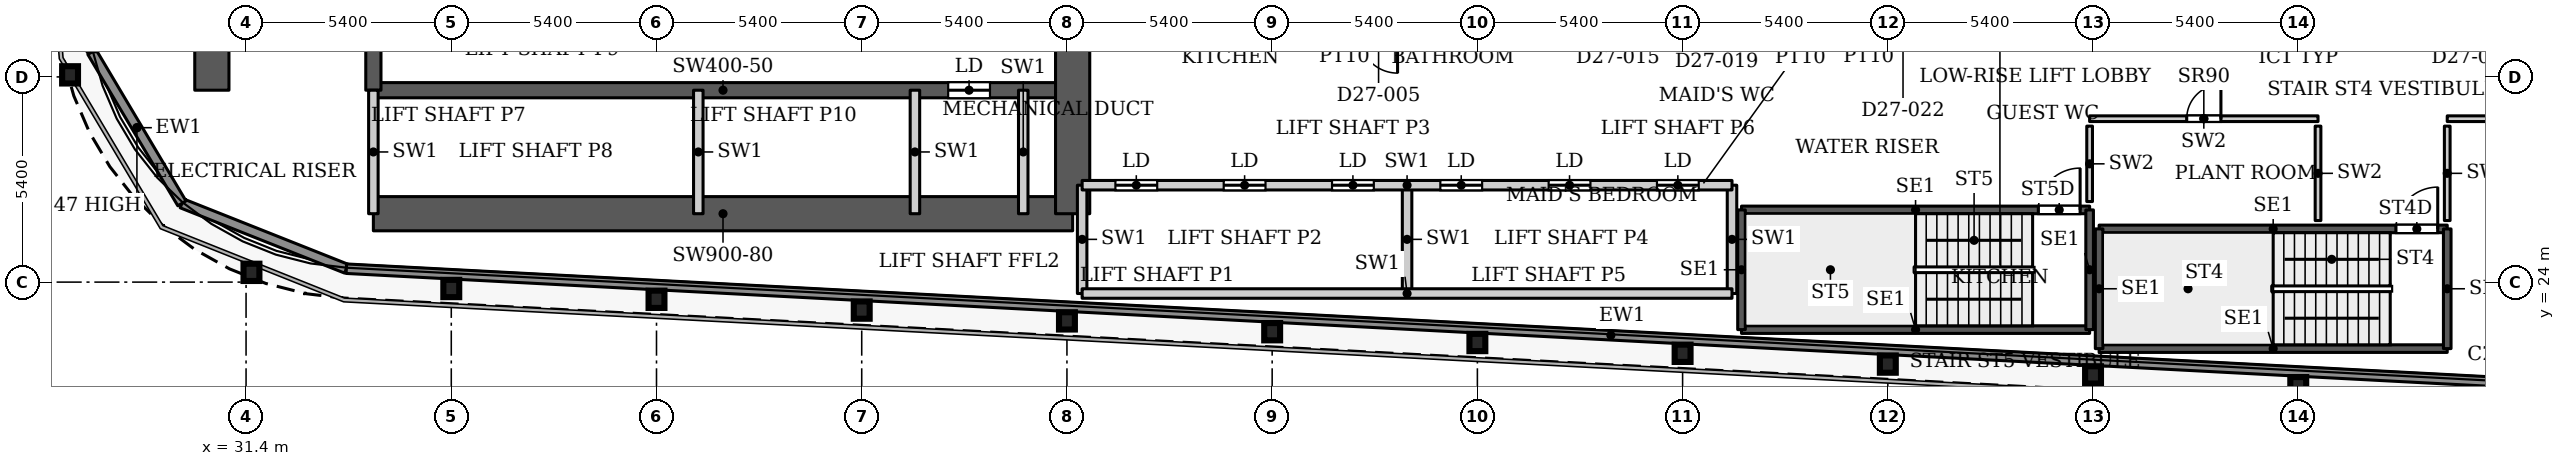
"""IFC4 building model, lengths in metres.
Left out: names, types, materials, properties, quantities, classifications, styles, units other than length and angle.
Written with IfcOpenShell. Run it as: python <this file> out.ifc"""

import sys

from ifc_helpers import new_model, si_unit, direction, frame, frame_2d, origin, origin_2d, place, context, subcontext, project, spatial, rectangle, i_section, extrude, source, transform, mapped, element, fill, save


model = new_model("IFC4")
c1 = context("Model", 3, precision=1e-05, world=origin(), true_north=direction((0.0, 1.0)))
c2 = subcontext(c1, "Body", "Model", "MODEL_VIEW")
j1 = project(units=[si_unit("LENGTHUNIT", "METRE"), si_unit("PLANEANGLEUNIT", "RADIAN")], contexts=[c1])
p1 = place(None, origin())
s1 = spatial("IfcSite", under=j1, at=p1, CompositionType="ELEMENT")
p2 = place(p1, origin())
s2 = spatial("IfcBuilding", under=s1, at=p2, CompositionType="ELEMENT")
p3 = place(p2, frame((0.0, 0.0, 117.5)))
s3 = spatial("IfcBuildingStorey", under=s2, at=p3, CompositionType="ELEMENT", Elevation=117.5)
for number, where, z_axis, x_axis in (
    (1, (85.4, 21.274, 0.0), (0.0, 0.0, 1.0), (1.0, 0.0, 0.0)),
    (2, (80.0, 21.558, 0.0), (0.0, 0.0, 1.0), (1.0, 0.0, 0.0)),
    (3, (74.6, 21.843, 0.0), (0.0, 0.0, 1.0), (1.0, 0.0, 0.0)),
    (4, (69.2, 22.127, 0.0), (0.0, 0.0, 1.0), (1.0, 0.0, 0.0)),
    (5, (63.8, 22.411, 0.0), (0.0, 0.0, 1.0), (1.0, 0.0, 0.0)),
    (6, (58.4, 22.695, 0.0), (0.0, 0.0, 1.0), (1.0, 0.0, 0.0)),
    (7, (53.0, 22.98, 0.0), (0.0, 0.0, 1.0), (1.0, 0.0, 0.0)),
    (8, (47.6, 23.264, 0.0), (0.0, 0.0, 1.0), (1.0, 0.0, 0.0)),
    (9, (42.2, 23.548, 0.0), (0.0, 0.0, 1.0), (1.0, 0.0, 0.0)),
    (10, (36.8, 23.832, 0.0), (0.0, 0.0, 1.0), (1.0, 0.0, 0.0)),
    (11, (31.542, 24.257, 0.0), (0.0, 0.0, 1.0), (1.0, 0.0, 0.0)),
    (12, (26.769, 29.454, 0.0), (0.0, 0.0, 1.0), (1.0, 0.0, 0.0)),
):
    element("IfcColumn", number, at=place(p3, frame(where, z_axis=z_axis, x_axis=x_axis)), inside=s3, PredefinedType="COLUMN", context=c2, shape_type="SweptSolid", body=[
        extrude(i_section(OverallWidth=0.418, OverallDepth=0.455, WebThickness=0.042, FlangeThickness=0.068, FilletRadius=0.014, at=origin_2d()), origin(), (0.0, 0.0, 1.0), 3.9),
    ])
p4 = place(p3, frame((34.75, 25.8, 0.0), z_axis=(0.0, 0.0, 1.0), x_axis=(1.0, 0.0, 0.0)))
e13 = element("IfcWall", 13, at=p4, inside=s3, PredefinedType="SHEAR", context=c2, shape_type="SweptSolid", body=[
    extrude(rectangle(XDim=18.4, YDim=0.9, at=frame_2d((9.2, 0.0))), origin(), (0.0, 0.0, 1.0), 3.9),
])
p5 = place(p3, frame((34.75, 29.05, 0.0), z_axis=(0.0, 0.0, 1.0), x_axis=(1.0, 0.0, 0.0)))
e14 = element("IfcWall", 14, at=p5, inside=s3, PredefinedType="SHEAR", context=c2, shape_type="SweptSolid", body=[
    extrude(rectangle(XDim=18.4, YDim=0.4, at=frame_2d((9.2, 0.0))), origin(), (0.0, 0.0, 1.0), 3.9),
])
p6 = place(p5, frame((15.125, 0.0, 0.0)))
e15 = element("IfcOpeningElement", 15, at=p6, cuts=e14, PredefinedType="OPENING", context=c2, shape_type="SweptSolid", body=[
    extrude(rectangle(XDim=1.1, YDim=2.2, at=frame_2d((0.55, 1.1))), frame((0.0, 0.21, 0.0), z_axis=(0.0, -1.0, 0.0), x_axis=(1.0, 0.0, 0.0)), (0.0, 0.0, 1.0), 0.42),
])
p7 = place(p3, frame((34.75, 29.05, 0.0), z_axis=(0.0, 0.0, 1.0), x_axis=(0.0, 1.0, 0.0)))
e16 = element("IfcWall", 16, at=p7, inside=s3, PredefinedType="SHEAR", context=c2, shape_type="SweptSolid", body=[
    extrude(rectangle(XDim=18.45, YDim=0.4, at=frame_2d((9.225, 0.0))), origin(), (0.0, 0.0, 1.0), 3.9),
])
p8 = place(p7, frame((8.025, 0.0, 0.0)))
e17 = element("IfcOpeningElement", 17, at=p8, cuts=e16, PredefinedType="OPENING", context=c2, shape_type="SweptSolid", body=[
    extrude(rectangle(XDim=1.1, YDim=2.2, at=frame_2d((0.55, 1.1))), frame((0.0, 0.21, 0.0), z_axis=(0.0, -1.0, 0.0), x_axis=(1.0, 0.0, 0.0)), (0.0, 0.0, 1.0), 0.42),
])
p9 = place(p7, frame((10.875, 0.0, 0.0)))
e18 = element("IfcOpeningElement", 18, at=p9, cuts=e16, PredefinedType="OPENING", context=c2, shape_type="SweptSolid", body=[
    extrude(rectangle(XDim=1.1, YDim=2.2, at=frame_2d((0.55, 1.1))), frame((0.0, 0.21, 0.0), z_axis=(0.0, -1.0, 0.0), x_axis=(1.0, 0.0, 0.0)), (0.0, 0.0, 1.0), 0.42),
])
p10 = place(p7, frame((13.725, 0.0, 0.0)))
e19 = element("IfcOpeningElement", 19, at=p10, cuts=e16, PredefinedType="OPENING", context=c2, shape_type="SweptSolid", body=[
    extrude(rectangle(XDim=1.1, YDim=2.2, at=frame_2d((0.55, 1.1))), frame((0.0, 0.21, 0.0), z_axis=(0.0, -1.0, 0.0), x_axis=(1.0, 0.0, 0.0)), (0.0, 0.0, 1.0), 0.42),
])
p11 = place(p7, frame((15.95, 0.0, 0.0)))
e20 = element("IfcOpeningElement", 20, at=p11, cuts=e16, PredefinedType="OPENING", context=c2, shape_type="SweptSolid", body=[
    extrude(rectangle(XDim=1.1, YDim=2.2, at=frame_2d((0.55, 1.1))), frame((0.0, 0.21, 0.0), z_axis=(0.0, -1.0, 0.0), x_axis=(1.0, 0.0, 0.0)), (0.0, 0.0, 1.0), 0.42),
])
p12 = place(p3, frame((30.5, 29.05, 0.0), z_axis=(0.0, 0.0, 1.0), x_axis=(0.0, 1.0, 0.0)))
e21 = element("IfcWall", 21, at=p12, inside=s3, PredefinedType="SHEAR", context=c2, shape_type="SweptSolid", body=[
    extrude(rectangle(XDim=18.45, YDim=0.9, at=frame_2d((9.225, 0.0))), origin(), (0.0, 0.0, 1.0), 3.9),
])
p13 = place(p12, frame((6.55, 0.0, 0.0)))
e22 = element("IfcOpeningElement", 22, at=p13, cuts=e21, PredefinedType="OPENING", context=c2, shape_type="SweptSolid", body=[
    extrude(rectangle(XDim=0.9, YDim=2.2, at=frame_2d((0.45, 1.1))), frame((0.0, 0.46, 0.0), z_axis=(0.0, -1.0, 0.0), x_axis=(1.0, 0.0, 0.0)), (0.0, 0.0, 1.0), 0.92),
])
p14 = place(p12, frame((11.025, 0.0, 0.0)))
e23 = element("IfcOpeningElement", 23, at=p14, cuts=e21, PredefinedType="OPENING", context=c2, shape_type="SweptSolid", body=[
    extrude(rectangle(XDim=0.9, YDim=2.2, at=frame_2d((0.45, 1.1))), frame((0.0, 0.46, 0.0), z_axis=(0.0, -1.0, 0.0), x_axis=(1.0, 0.0, 0.0)), (0.0, 0.0, 1.0), 0.92),
])
p15 = place(p3, frame((53.15, 25.8, 0.0), z_axis=(0.0, 0.0, 1.0), x_axis=(0.0, 1.0, 0.0)))
e24 = element("IfcWall", 24, at=p15, inside=s3, PredefinedType="SHEAR", context=c2, shape_type="SweptSolid", body=[
    extrude(rectangle(XDim=10.4, YDim=0.9, at=frame_2d((5.2, 0.0))), origin(), (0.0, 0.0, 1.0), 3.9),
])
p16 = place(p3, frame((34.039, 24.353, 0.0), z_axis=(0.0, 0.0, 1.0), x_axis=(-0.929352825399, 0.369192803184, 0.0)))
e25 = element("IfcWall", 25, at=p16, inside=s3, PredefinedType="SOLIDWALL", context=c2, shape_type="SweptSolid", body=[
    extrude(rectangle(XDim=4.656, YDim=0.25, at=frame_2d((2.328, 0.0))), origin(), (0.0, 0.0, 1.0), 3.75),
])
p17 = place(p3, frame((29.712, 26.072, 0.0), z_axis=(0.0, 0.0, 1.0), x_axis=(-0.511028049012, 0.859564036662, 0.0)))
e26 = element("IfcWall", 26, at=p17, inside=s3, PredefinedType="SOLIDWALL", context=c2, shape_type="SweptSolid", body=[
    extrude(rectangle(XDim=4.634, YDim=0.25, at=frame_2d((2.317, 0.0))), origin(), (0.0, 0.0, 1.0), 3.147),
])
p18 = place(p3, frame((27.344, 30.055, 0.0), z_axis=(0.0, 0.0, 1.0), x_axis=(-0.077571675317, 0.99698677784, 0.0)))
e27 = element("IfcWall", 27, at=p18, inside=s3, PredefinedType="SOLIDWALL", context=c2, shape_type="SweptSolid", body=[
    extrude(rectangle(XDim=1.92, YDim=0.25, at=frame_2d((0.96, 0.0))), origin(), (0.0, 0.0, 1.0), 3.75),
])
p19 = place(p3, frame((100.586, 20.85, 0.0), z_axis=(0.0, 0.0, 1.0), x_axis=(-0.99861746497, 0.052565755559, 0.0)))
e28 = element("IfcWall", 28, at=p19, inside=s3, PredefinedType="SOLIDWALL", context=c2, shape_type="SweptSolid", body=[
    extrude(rectangle(XDim=66.639, YDim=0.25, at=frame_2d((33.319, 0.0))), origin(), (0.0, 0.0, 1.0), 3.75),
])
p20 = place(p3, frame((80.16, 22.25, 0.0), z_axis=(0.0, 0.0, 1.0), x_axis=(1.0, 0.0, 0.0)))
e29 = element("IfcWall", 29, at=p20, inside=s3, PredefinedType="SHEAR", context=c2, shape_type="SweptSolid", body=[
    extrude(rectangle(XDim=9.16, YDim=0.2, at=frame_2d((4.58, 0.0))), origin(), (0.0, 0.0, 1.0), 3.9),
])
p21 = place(p3, frame((80.16, 25.4, 0.0), z_axis=(0.0, 0.0, 1.0), x_axis=(1.0, 0.0, 0.0)))
e30 = element("IfcWall", 30, at=p21, inside=s3, PredefinedType="SHEAR", context=c2, shape_type="SweptSolid", body=[
    extrude(rectangle(XDim=9.16, YDim=0.2, at=frame_2d((4.58, 0.0))), origin(), (0.0, 0.0, 1.0), 3.9),
])
p22 = place(p21, frame((7.81, 0.0, 0.0)))
e31 = element("IfcOpeningElement", 31, at=p22, cuts=e30, PredefinedType="OPENING", context=c2, shape_type="SweptSolid", body=[
    extrude(rectangle(XDim=1.1, YDim=2.2, at=frame_2d((0.55, 1.1))), frame((0.0, 0.11, 0.0), z_axis=(0.0, -1.0, 0.0), x_axis=(1.0, 0.0, 0.0)), (0.0, 0.0, 1.0), 0.22),
])
for number, where, z_axis, x_axis in (
    (32, (80.16, 22.25, 0.0), (0.0, 0.0, 1.0), (0.0, 1.0, 0.0)),
    (33, (89.32, 22.25, 0.0), (0.0, 0.0, 1.0), (0.0, 1.0, 0.0)),
):
    element("IfcWall", number, at=place(p3, frame(where, z_axis=z_axis, x_axis=x_axis)), inside=s3, PredefinedType="SHEAR", context=c2, shape_type="SweptSolid", body=[
        extrude(rectangle(XDim=3.15, YDim=0.2, at=frame_2d((1.575, 0.0))), origin(), (0.0, 0.0, 1.0), 3.9),
    ])
p23 = place(p3, frame((70.75, 22.75, 0.0), z_axis=(0.0, 0.0, 1.0), x_axis=(1.0, 0.0, 0.0)))
e34 = element("IfcWall", 34, at=p23, inside=s3, PredefinedType="SHEAR", context=c2, shape_type="SweptSolid", body=[
    extrude(rectangle(XDim=9.16, YDim=0.2, at=frame_2d((4.58, 0.0))), origin(), (0.0, 0.0, 1.0), 3.9),
])
p24 = place(p3, frame((70.75, 25.9, 0.0), z_axis=(0.0, 0.0, 1.0), x_axis=(1.0, 0.0, 0.0)))
e35 = element("IfcWall", 35, at=p24, inside=s3, PredefinedType="SHEAR", context=c2, shape_type="SweptSolid", body=[
    extrude(rectangle(XDim=9.16, YDim=0.2, at=frame_2d((4.58, 0.0))), origin(), (0.0, 0.0, 1.0), 3.9),
])
p25 = place(p24, frame((7.81, 0.0, 0.0)))
e36 = element("IfcOpeningElement", 36, at=p25, cuts=e35, PredefinedType="OPENING", context=c2, shape_type="SweptSolid", body=[
    extrude(rectangle(XDim=1.1, YDim=2.2, at=frame_2d((0.55, 1.1))), frame((0.0, 0.11, 0.0), z_axis=(0.0, -1.0, 0.0), x_axis=(1.0, 0.0, 0.0)), (0.0, 0.0, 1.0), 0.22),
])
for number, where, z_axis, x_axis in (
    (37, (70.75, 22.75, 0.0), (0.0, 0.0, 1.0), (0.0, 1.0, 0.0)),
    (38, (79.91, 22.75, 0.0), (0.0, 0.0, 1.0), (0.0, 1.0, 0.0)),
):
    element("IfcWall", number, at=place(p3, frame(where, z_axis=z_axis, x_axis=x_axis)), inside=s3, PredefinedType="SHEAR", context=c2, shape_type="SweptSolid", body=[
        extrude(rectangle(XDim=3.15, YDim=0.2, at=frame_2d((1.575, 0.0))), origin(), (0.0, 0.0, 1.0), 3.9),
    ])
for number, where, z_axis, x_axis in (
    (39, (34.75, 25.8, 0.0), (0.0, 0.0, 1.0), (0.0, 1.0, 0.0)),
    (40, (43.3, 25.8, 0.0), (0.0, 0.0, 1.0), (0.0, 1.0, 0.0)),
    (41, (49.0, 25.8, 0.0), (0.0, 0.0, 1.0), (0.0, 1.0, 0.0)),
    (42, (51.85, 25.8, 0.0), (0.0, 0.0, 1.0), (0.0, 1.0, 0.0)),
):
    element("IfcWall", number, at=place(p3, frame(where, z_axis=z_axis, x_axis=x_axis)), inside=s3, PredefinedType="PARTITIONING", context=c2, shape_type="SweptSolid", body=[
        extrude(rectangle(XDim=3.25, YDim=0.25, at=frame_2d((1.625, 0.0))), origin(), (0.0, 0.0, 1.0), 3.9),
    ])
for number, where, z_axis, x_axis in (
    (43, (53.4, 23.7, 0.0), (0.0, 0.0, 1.0), (0.0, 1.0, 0.0)),
    (44, (61.95, 23.7, 0.0), (0.0, 0.0, 1.0), (0.0, 1.0, 0.0)),
    (45, (70.5, 23.7, 0.0), (0.0, 0.0, 1.0), (0.0, 1.0, 0.0)),
):
    element("IfcWall", number, at=place(p3, frame(where, z_axis=z_axis, x_axis=x_axis)), inside=s3, PredefinedType="PARTITIONING", context=c2, shape_type="SweptSolid", body=[
        extrude(rectangle(XDim=2.85, YDim=0.25, at=frame_2d((1.425, 0.0))), origin(), (0.0, 0.0, 1.0), 3.9),
    ])
p26 = place(p3, frame((53.4, 23.7, 0.0), z_axis=(0.0, 0.0, 1.0), x_axis=(1.0, 0.0, 0.0)))
e46 = element("IfcWall", 46, at=p26, inside=s3, PredefinedType="PARTITIONING", context=c2, shape_type="SweptSolid", body=[
    extrude(rectangle(XDim=17.1, YDim=0.25, at=frame_2d((8.55, 0.0))), origin(), (0.0, 0.0, 1.0), 3.9),
])
p27 = place(p3, frame((53.4, 26.55, 0.0), z_axis=(0.0, 0.0, 1.0), x_axis=(1.0, 0.0, 0.0)))
e47 = element("IfcWall", 47, at=p27, inside=s3, PredefinedType="PARTITIONING", context=c2, shape_type="SweptSolid", body=[
    extrude(rectangle(XDim=17.1, YDim=0.25, at=frame_2d((8.55, 0.0))), origin(), (0.0, 0.0, 1.0), 3.9),
])
p28 = place(p27, frame((0.875, 0.0, 0.0)))
e48 = element("IfcOpeningElement", 48, at=p28, cuts=e47, PredefinedType="OPENING", context=c2, shape_type="SweptSolid", body=[
    extrude(rectangle(XDim=1.1, YDim=2.2, at=frame_2d((0.55, 1.1))), frame((0.0, 0.135, 0.0), z_axis=(0.0, -1.0, 0.0), x_axis=(1.0, 0.0, 0.0)), (0.0, 0.0, 1.0), 0.27),
])
p29 = place(p27, frame((3.725, 0.0, 0.0)))
e49 = element("IfcOpeningElement", 49, at=p29, cuts=e47, PredefinedType="OPENING", context=c2, shape_type="SweptSolid", body=[
    extrude(rectangle(XDim=1.1, YDim=2.2, at=frame_2d((0.55, 1.1))), frame((0.0, 0.135, 0.0), z_axis=(0.0, -1.0, 0.0), x_axis=(1.0, 0.0, 0.0)), (0.0, 0.0, 1.0), 0.27),
])
p30 = place(p27, frame((6.575, 0.0, 0.0)))
e50 = element("IfcOpeningElement", 50, at=p30, cuts=e47, PredefinedType="OPENING", context=c2, shape_type="SweptSolid", body=[
    extrude(rectangle(XDim=1.1, YDim=2.2, at=frame_2d((0.55, 1.1))), frame((0.0, 0.135, 0.0), z_axis=(0.0, -1.0, 0.0), x_axis=(1.0, 0.0, 0.0)), (0.0, 0.0, 1.0), 0.27),
])
p31 = place(p27, frame((9.425, 0.0, 0.0)))
e51 = element("IfcOpeningElement", 51, at=p31, cuts=e47, PredefinedType="OPENING", context=c2, shape_type="SweptSolid", body=[
    extrude(rectangle(XDim=1.1, YDim=2.2, at=frame_2d((0.55, 1.1))), frame((0.0, 0.135, 0.0), z_axis=(0.0, -1.0, 0.0), x_axis=(1.0, 0.0, 0.0)), (0.0, 0.0, 1.0), 0.27),
])
p32 = place(p27, frame((12.275, 0.0, 0.0)))
e52 = element("IfcOpeningElement", 52, at=p32, cuts=e47, PredefinedType="OPENING", context=c2, shape_type="SweptSolid", body=[
    extrude(rectangle(XDim=1.1, YDim=2.2, at=frame_2d((0.55, 1.1))), frame((0.0, 0.135, 0.0), z_axis=(0.0, -1.0, 0.0), x_axis=(1.0, 0.0, 0.0)), (0.0, 0.0, 1.0), 0.27),
])
p33 = place(p27, frame((15.125, 0.0, 0.0)))
e53 = element("IfcOpeningElement", 53, at=p33, cuts=e47, PredefinedType="OPENING", context=c2, shape_type="SweptSolid", body=[
    extrude(rectangle(XDim=1.1, YDim=2.2, at=frame_2d((0.55, 1.1))), frame((0.0, 0.135, 0.0), z_axis=(0.0, -1.0, 0.0), x_axis=(1.0, 0.0, 0.0)), (0.0, 0.0, 1.0), 0.27),
])
p34 = place(p3, frame((79.91, 28.3, 0.0), z_axis=(0.0, 0.0, 1.0), x_axis=(1.0, 0.0, 0.0)))
e54 = element("IfcWall", 54, at=p34, inside=s3, PredefinedType="PARTITIONING", context=c2, shape_type="SweptSolid", body=[
    extrude(rectangle(XDim=6.01, YDim=0.15, at=frame_2d((3.005, 0.0))), origin(), (0.0, 0.0, 1.0), 3.9),
])
p35 = place(p34, frame((2.555, 0.0, 0.0)))
e55 = element("IfcOpeningElement", 55, at=p35, cuts=e54, PredefinedType="OPENING", context=c2, shape_type="SweptSolid", body=[
    extrude(rectangle(XDim=0.9, YDim=2.2, at=frame_2d((0.45, 1.1))), frame((0.0, 0.085, 0.0), z_axis=(0.0, -1.0, 0.0), x_axis=(1.0, 0.0, 0.0)), (0.0, 0.0, 1.0), 0.17),
])
p36 = place(p3, frame((79.91, 26.12, 0.0), z_axis=(0.0, 0.0, 1.0), x_axis=(0.0, 1.0, 0.0)))
e56 = element("IfcWall", 56, at=p36, inside=s3, PredefinedType="PARTITIONING", context=c2, shape_type="SweptSolid", body=[
    extrude(rectangle(XDim=1.985, YDim=0.15, at=frame_2d((0.992, 0.0))), origin(), (0.0, 0.0, 1.0), 3.9),
])
p37 = place(p3, frame((85.92, 25.62, 0.0), z_axis=(0.0, 0.0, 1.0), x_axis=(0.0, 1.0, 0.0)))
e57 = element("IfcWall", 57, at=p37, inside=s3, PredefinedType="PARTITIONING", context=c2, shape_type="SweptSolid", body=[
    extrude(rectangle(XDim=2.485, YDim=0.15, at=frame_2d((1.242, 0.0))), origin(), (0.0, 0.0, 1.0), 3.9),
])
p38 = place(p3, frame((89.32, 28.3, 0.0), z_axis=(0.0, 0.0, 1.0), x_axis=(1.0, 0.0, 0.0)))
e58 = element("IfcWall", 58, at=p38, inside=s3, PredefinedType="PARTITIONING", context=c2, shape_type="SweptSolid", body=[
    extrude(rectangle(XDim=10.578, YDim=0.15, at=frame_2d((5.289, 0.0))), origin(), (0.0, 0.0, 1.0), 2.5),
])
p39 = place(p38, frame((3.89, 0.0, 0.0)))
e59 = element("IfcOpeningElement", 59, at=p39, cuts=e58, PredefinedType="OPENING", context=c2, shape_type="SweptSolid", body=[
    extrude(rectangle(XDim=0.9, YDim=2.2, at=frame_2d((0.45, 1.1))), frame((0.0, 0.085, 0.0), z_axis=(0.0, -1.0, 0.0), x_axis=(1.0, 0.0, 0.0)), (0.0, 0.0, 1.0), 0.17),
])
p40 = place(p3, frame((89.32, 25.62, 0.0), z_axis=(0.0, 0.0, 1.0), x_axis=(0.0, 1.0, 0.0)))
e60 = element("IfcWall", 60, at=p40, inside=s3, PredefinedType="PARTITIONING", context=c2, shape_type="SweptSolid", body=[
    extrude(rectangle(XDim=2.485, YDim=0.15, at=frame_2d((1.242, 0.0))), origin(), (0.0, 0.0, 1.0), 3.9),
])
m1 = source(origin(), c2, "Body", "SweptSolid", [
    extrude(rectangle(XDim=1.1, YDim=2.2, at=frame_2d((0.55, 1.1))), frame((0.0, 0.025, 0.0), z_axis=(0.0, -1.0, 0.0), x_axis=(1.0, 0.0, 0.0)), (0.0, 0.0, 1.0), 0.05),
])
p41 = place(p28, origin())
e61 = element("IfcDoor", 61, at=p41, inside=s3, OperationType="SLIDING_TO_LEFT", PredefinedType="DOOR", context=c2, shape_type="MappedRepresentation", body=[
    mapped(m1, transform((0.0, 0.0, 0.0), x_axis=(1.0, 0.0, 0.0), y_axis=(0.0, 1.0, 0.0), z_axis=(0.0, 0.0, 1.0), scale=1.0)),
])
fill(e48, e61)
p42 = place(p29, origin())
e62 = element("IfcDoor", 62, at=p42, inside=s3, OperationType="SLIDING_TO_LEFT", PredefinedType="DOOR", context=c2, shape_type="MappedRepresentation", body=[
    mapped(m1, transform((0.0, 0.0, 0.0), x_axis=(1.0, 0.0, 0.0), y_axis=(0.0, 1.0, 0.0), z_axis=(0.0, 0.0, 1.0), scale=1.0)),
])
fill(e49, e62)
p43 = place(p30, origin())
e63 = element("IfcDoor", 63, at=p43, inside=s3, OperationType="SLIDING_TO_LEFT", PredefinedType="DOOR", context=c2, shape_type="MappedRepresentation", body=[
    mapped(m1, transform((0.0, 0.0, 0.0), x_axis=(1.0, 0.0, 0.0), y_axis=(0.0, 1.0, 0.0), z_axis=(0.0, 0.0, 1.0), scale=1.0)),
])
fill(e50, e63)
p44 = place(p31, origin())
e64 = element("IfcDoor", 64, at=p44, inside=s3, OperationType="SLIDING_TO_LEFT", PredefinedType="DOOR", context=c2, shape_type="MappedRepresentation", body=[
    mapped(m1, transform((0.0, 0.0, 0.0), x_axis=(1.0, 0.0, 0.0), y_axis=(0.0, 1.0, 0.0), z_axis=(0.0, 0.0, 1.0), scale=1.0)),
])
fill(e51, e64)
p45 = place(p32, origin())
e65 = element("IfcDoor", 65, at=p45, inside=s3, OperationType="SLIDING_TO_LEFT", PredefinedType="DOOR", context=c2, shape_type="MappedRepresentation", body=[
    mapped(m1, transform((0.0, 0.0, 0.0), x_axis=(1.0, 0.0, 0.0), y_axis=(0.0, 1.0, 0.0), z_axis=(0.0, 0.0, 1.0), scale=1.0)),
])
fill(e52, e65)
p46 = place(p33, origin())
e66 = element("IfcDoor", 66, at=p46, inside=s3, OperationType="SLIDING_TO_LEFT", PredefinedType="DOOR", context=c2, shape_type="MappedRepresentation", body=[
    mapped(m1, transform((0.0, 0.0, 0.0), x_axis=(1.0, 0.0, 0.0), y_axis=(0.0, 1.0, 0.0), z_axis=(0.0, 0.0, 1.0), scale=1.0)),
])
fill(e53, e66)
p47 = place(p6, origin())
e67 = element("IfcDoor", 67, at=p47, inside=s3, OperationType="SLIDING_TO_LEFT", PredefinedType="DOOR", context=c2, shape_type="MappedRepresentation", body=[
    mapped(m1, transform((0.0, 0.0, 0.0), x_axis=(1.0, 0.0, 0.0), y_axis=(0.0, 1.0, 0.0), z_axis=(0.0, 0.0, 1.0), scale=1.0)),
])
fill(e15, e67)
m2 = source(origin(), c2, "Body", "SweptSolid", [
    extrude(rectangle(XDim=0.9, YDim=2.2, at=frame_2d((0.45, 1.1))), frame((0.0, 0.025, 0.0), z_axis=(0.0, -1.0, 0.0), x_axis=(1.0, 0.0, 0.0)), (0.0, 0.0, 1.0), 0.05),
])
p48 = place(p35, origin())
e68 = element("IfcDoor", 68, at=p48, inside=s3, OperationType="SINGLE_SWING_LEFT", PredefinedType="DOOR", context=c2, shape_type="MappedRepresentation", body=[
    mapped(m2, transform((0.0, 0.0, 0.0), x_axis=(1.0, 0.0, 0.0), y_axis=(0.0, 1.0, 0.0), z_axis=(0.0, 0.0, 1.0), scale=1.0)),
])
fill(e55, e68)
m3 = source(origin(), c2, "Body", "SweptSolid", [
    extrude(rectangle(XDim=1.1, YDim=2.2, at=frame_2d((0.55, 1.1))), frame((0.0, 0.025, 0.0), z_axis=(0.0, -1.0, 0.0), x_axis=(1.0, 0.0, 0.0)), (0.0, 0.0, 1.0), 0.05),
])
p49 = place(p22, origin())
e69 = element("IfcDoor", 69, at=p49, inside=s3, OperationType="SINGLE_SWING_LEFT", PredefinedType="DOOR", context=c2, shape_type="MappedRepresentation", body=[
    mapped(m3, transform((0.0, 0.0, 0.0), x_axis=(1.0, 0.0, 0.0), y_axis=(0.0, 1.0, 0.0), z_axis=(0.0, 0.0, 1.0), scale=1.0)),
])
fill(e31, e69)
p50 = place(p25, origin())
e70 = element("IfcDoor", 70, at=p50, inside=s3, OperationType="SINGLE_SWING_LEFT", PredefinedType="DOOR", context=c2, shape_type="MappedRepresentation", body=[
    mapped(m3, transform((0.0, 0.0, 0.0), x_axis=(1.0, 0.0, 0.0), y_axis=(0.0, 1.0, 0.0), z_axis=(0.0, 0.0, 1.0), scale=1.0)),
])
fill(e36, e70)
save(model, sys.argv[1])
